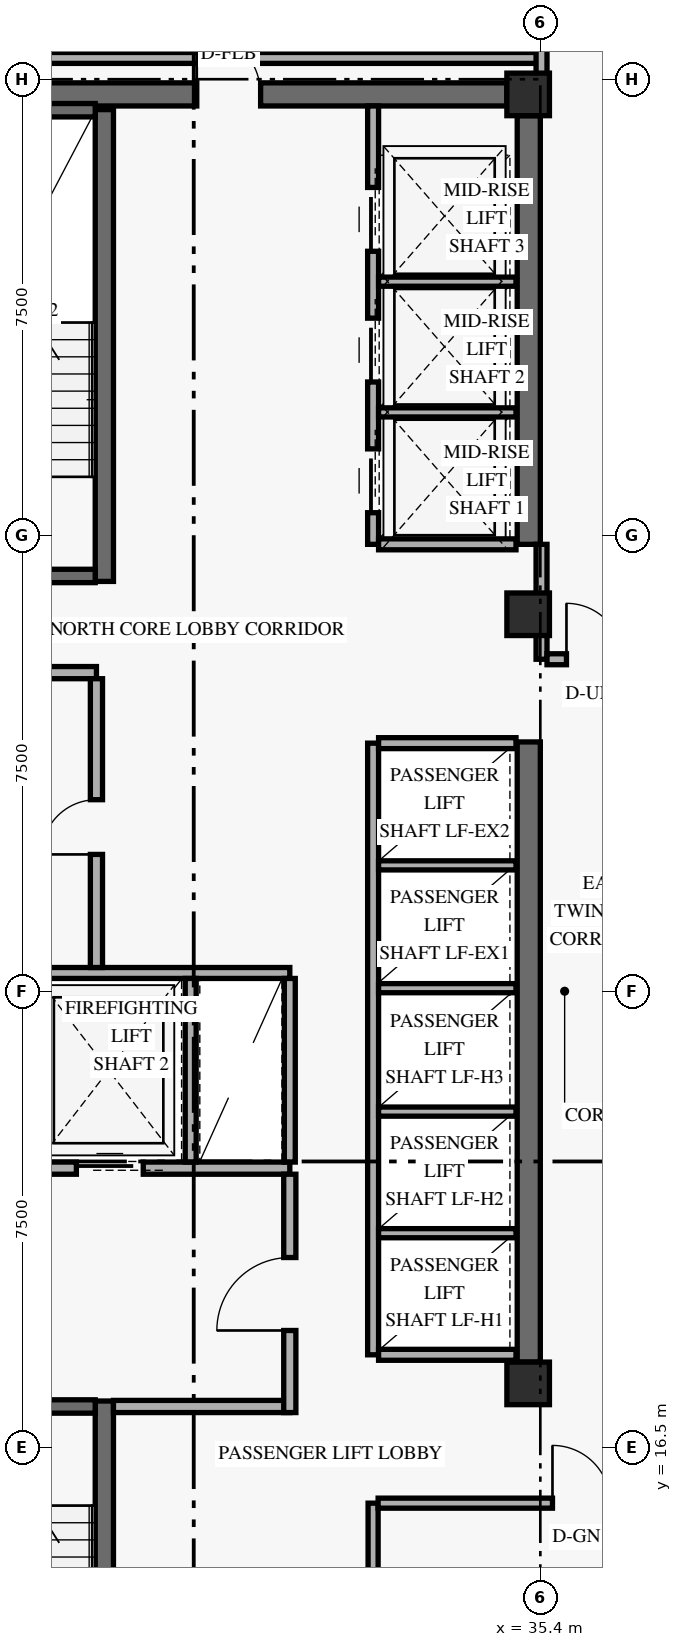
"""IFC4 building model, lengths in metres.
Left out: names, types, materials, properties, quantities, classifications, styles, units other than length and angle.
Written with IfcOpenShell. Run it as: python <this file> out.ifc"""

import sys

from ifc_helpers import new_model, si_unit, direction, frame, frame_2d, origin, origin_2d, place, context, subcontext, project, spatial, rectangle, extrude, element, fill, save


model = new_model("IFC4")
c1 = context("Model", 3, precision=1e-05, world=origin(), true_north=direction((0.0, 1.0)))
c2 = subcontext(c1, "Body", "Model", "MODEL_VIEW")
j1 = project(units=[si_unit("LENGTHUNIT", "METRE"), si_unit("PLANEANGLEUNIT", "RADIAN")], contexts=[c1])
p1 = place(None, origin())
s1 = spatial("IfcSite", under=j1, at=p1, CompositionType="ELEMENT")
p2 = place(p1, origin())
s2 = spatial("IfcBuilding", under=s1, at=p2, CompositionType="ELEMENT")
p3 = place(p2, frame((0.0, 0.0, 144.6)))
s3 = spatial("IfcBuildingStorey", under=s2, at=p3, CompositionType="ELEMENT", Elevation=144.6)
p4 = place(p3, frame((35.21, 17.9, 0.0), z_axis=(0.0, 0.0, 1.0), x_axis=(0.0, 1.0, 0.0)))
e1 = element("IfcWall", 1, at=p4, inside=s3, PredefinedType="SHEAR", context=c2, shape_type="SweptSolid", body=[
    extrude(rectangle(XDim=10.2, YDim=0.38, at=frame_2d((5.1, 0.0))), origin(), (0.0, 0.0, 1.0), 2.748),
])
p5 = place(p3, frame((35.21, 31.35, 0.0), z_axis=(0.0, 0.0, 1.0), x_axis=(0.0, 1.0, 0.0)))
e2 = element("IfcWall", 2, at=p5, inside=s3, PredefinedType="SHEAR", context=c2, shape_type="SweptSolid", body=[
    extrude(rectangle(XDim=7.05, YDim=0.38, at=frame_2d((3.525, 0.0))), origin(), (0.0, 0.0, 1.0), 2.748),
])
p6 = place(p3, frame((24.55, 38.75, 0.0), z_axis=(0.0, 0.0, 1.0), x_axis=(1.0, 0.0, 0.0)))
e3 = element("IfcWall", 3, at=p6, inside=s3, PredefinedType="SHEAR", context=c2, shape_type="SweptSolid", body=[
    extrude(rectangle(XDim=10.3, YDim=0.38, at=frame_2d((5.15, 0.0))), origin(), (0.0, 0.0, 1.0), 3.36),
])
p7 = place(p6, frame((5.2, 0.0, 0.0)))
e4 = element("IfcOpeningElement", 4, at=p7, cuts=e3, PredefinedType="OPENING", context=c2, shape_type="SweptSolid", body=[
    extrude(rectangle(XDim=1.05, YDim=2.15, at=frame_2d((0.525, 1.075))), frame((0.0, 0.2, 0.0), z_axis=(0.0, -1.0, 0.0), x_axis=(1.0, 0.0, 0.0)), (0.0, 0.0, 1.0), 0.4),
])
p8 = place(p3, frame((28.23, 9.5, 0.0), z_axis=(0.0, 0.0, 1.0), x_axis=(0.0, 1.0, 0.0)))
e5 = element("IfcWall", 5, at=p8, inside=s3, PredefinedType="SHEAR", context=c2, shape_type="SweptSolid", body=[
    extrude(rectangle(XDim=7.76, YDim=0.3, at=frame_2d((3.88, 0.0))), origin(), (0.0, 0.0, 1.0), 3.36),
])
p9 = place(p3, frame((24.92, 17.17, 0.0), z_axis=(0.0, 0.0, 1.0), x_axis=(1.0, 0.0, 0.0)))
e6 = element("IfcWall", 6, at=p9, inside=s3, PredefinedType="SHEAR", context=c2, shape_type="SweptSolid", body=[
    extrude(rectangle(XDim=3.16, YDim=0.22, at=frame_2d((1.58, 0.0))), origin(), (0.0, 0.0, 1.0), 3.36),
])
p10 = place(p9, frame((0.78, 0.0, 0.0)))
e7 = element("IfcOpeningElement", 7, at=p10, cuts=e6, PredefinedType="OPENING", context=c2, shape_type="SweptSolid", body=[
    extrude(rectangle(XDim=1.05, YDim=2.15, at=frame_2d((0.525, 1.075))), frame((0.0, 0.12, 0.0), z_axis=(0.0, -1.0, 0.0), x_axis=(1.0, 0.0, 0.0)), (0.0, 0.0, 1.0), 0.24),
])
p11 = place(p3, frame((28.23, 30.74, 0.0), z_axis=(0.0, 0.0, 1.0), x_axis=(0.0, 1.0, 0.0)))
e8 = element("IfcWall", 8, at=p11, inside=s3, PredefinedType="SHEAR", context=c2, shape_type="SweptSolid", body=[
    extrude(rectangle(XDim=7.76, YDim=0.3, at=frame_2d((3.88, 0.0))), origin(), (0.0, 0.0, 1.0), 3.36),
])
p12 = place(p3, frame((24.92, 30.83, 0.0), z_axis=(0.0, 0.0, 1.0), x_axis=(1.0, 0.0, 0.0)))
e9 = element("IfcWall", 9, at=p12, inside=s3, PredefinedType="SHEAR", context=c2, shape_type="SweptSolid", body=[
    extrude(rectangle(XDim=3.16, YDim=0.22, at=frame_2d((1.58, 0.0))), origin(), (0.0, 0.0, 1.0), 3.36),
])
p13 = place(p12, frame((0.78, 0.0, 0.0)))
e10 = element("IfcOpeningElement", 10, at=p13, cuts=e9, PredefinedType="OPENING", context=c2, shape_type="SweptSolid", body=[
    extrude(rectangle(XDim=1.05, YDim=2.15, at=frame_2d((0.525, 1.075))), frame((0.0, 0.12, 0.0), z_axis=(0.0, -1.0, 0.0), x_axis=(1.0, 0.0, 0.0)), (0.0, 0.0, 1.0), 0.24),
])
p14 = place(p3, frame((24.92, 38.49, 0.0), z_axis=(0.0, 0.0, 1.0), x_axis=(1.0, 0.0, 0.0)))
e11 = element("IfcWall", 11, at=p14, inside=s3, PredefinedType="SHEAR", context=c2, shape_type="SweptSolid", body=[
    extrude(rectangle(XDim=3.16, YDim=0.22, at=frame_2d((1.58, 0.0))), origin(), (0.0, 0.0, 1.0), 3.36),
])
for number, where, z_axis, x_axis in (
    (12, (35.2, 17.55, 0.0), (0.0, 0.0, 1.0), (1.0, 0.0, 0.0)),
    (13, (35.2, 30.2, 0.0), (0.0, 0.0, 1.0), (1.0, 0.0, 0.0)),
    (14, (35.2, 38.75, 0.0), (0.0, 0.0, 1.0), (1.0, 0.0, 0.0)),
):
    element("IfcColumn", number, at=place(p3, frame(where, z_axis=z_axis, x_axis=x_axis)), inside=s3, PredefinedType="COLUMN", context=c2, shape_type="SweptSolid", body=[
        extrude(rectangle(XDim=0.7, YDim=0.7, at=origin_2d()), origin(), (0.0, 0.0, 1.0), 3.6),
    ])
p15 = place(p3, frame((24.45, 21.09, 0.0), z_axis=(0.0, 0.0, 1.0), x_axis=(1.0, 0.0, 0.0)))
e15 = element("IfcWall", 15, at=p15, inside=s3, PredefinedType="STANDARD", context=c2, shape_type="SweptSolid", body=[
    extrude(rectangle(XDim=6.83, YDim=0.2, at=frame_2d((3.415, 0.0))), origin(), (0.0, 0.0, 1.0), 3.36),
])
p16 = place(p15, frame((0.72, 0.0, 0.0)))
e16 = element("IfcOpeningElement", 16, at=p16, cuts=e15, PredefinedType="OPENING", context=c2, shape_type="SweptSolid", body=[
    extrude(rectangle(XDim=1.1, YDim=2.2, at=frame_2d((0.55, 1.1))), frame((0.0, 0.11, 0.0), z_axis=(0.0, -1.0, 0.0), x_axis=(1.0, 0.0, 0.0)), (0.0, 0.0, 1.0), 0.22),
])
p17 = place(p15, frame((3.32, 0.0, 0.0)))
e17 = element("IfcOpeningElement", 17, at=p17, cuts=e15, PredefinedType="OPENING", context=c2, shape_type="SweptSolid", body=[
    extrude(rectangle(XDim=1.1, YDim=2.2, at=frame_2d((0.55, 1.1))), frame((0.0, 0.11, 0.0), z_axis=(0.0, -1.0, 0.0), x_axis=(1.0, 0.0, 0.0)), (0.0, 0.0, 1.0), 0.22),
])
p18 = place(p3, frame((28.38, 17.17, 0.0), z_axis=(0.0, 0.0, 1.0), x_axis=(1.0, 0.0, 0.0)))
e18 = element("IfcWall", 18, at=p18, inside=s3, PredefinedType="STANDARD", context=c2, shape_type="SweptSolid", body=[
    extrude(rectangle(XDim=2.9, YDim=0.2, at=frame_2d((1.45, 0.0))), origin(), (0.0, 0.0, 1.0), 3.36),
])
p19 = place(p3, frame((31.28, 17.07, 0.0), z_axis=(0.0, 0.0, 1.0), x_axis=(0.0, 1.0, 0.0)))
e19 = element("IfcWall", 19, at=p19, inside=s3, PredefinedType="STANDARD", context=c2, shape_type="SweptSolid", body=[
    extrude(rectangle(XDim=3.92, YDim=0.2, at=frame_2d((1.96, 0.0))), origin(), (0.0, 0.0, 1.0), 2.73),
])
p20 = place(p19, frame((1.35, 0.0, 0.0)))
e20 = element("IfcOpeningElement", 20, at=p20, cuts=e19, PredefinedType="OPENING", context=c2, shape_type="SweptSolid", body=[
    extrude(rectangle(XDim=1.2, YDim=2.15, at=frame_2d((0.6, 1.075))), frame((0.0, 0.11, 0.0), z_axis=(0.0, -1.0, 0.0), x_axis=(1.0, 0.0, 0.0)), (0.0, 0.0, 1.0), 0.22),
])
p21 = place(p3, frame((24.45, 24.3, 0.0), z_axis=(0.0, 0.0, 1.0), x_axis=(1.0, 0.0, 0.0)))
e21 = element("IfcWall", 21, at=p21, inside=s3, PredefinedType="STANDARD", context=c2, shape_type="SweptSolid", body=[
    extrude(rectangle(XDim=6.83, YDim=0.18, at=frame_2d((3.415, 0.0))), origin(), (0.0, 0.0, 1.0), 3.36),
])
for number, where, z_axis, x_axis in (
    (22, (29.65, 21.19, 0.0), (0.0, 0.0, 1.0), (0.0, 1.0, 0.0)),
    (23, (31.28, 21.19, 0.0), (0.0, 0.0, 1.0), (0.0, 1.0, 0.0)),
):
    element("IfcWall", number, at=place(p3, frame(where, z_axis=z_axis, x_axis=x_axis)), inside=s3, PredefinedType="STANDARD", context=c2, shape_type="SweptSolid", body=[
        extrude(rectangle(XDim=3.02, YDim=0.18, at=frame_2d((1.51, 0.0))), origin(), (0.0, 0.0, 1.0), 3.36),
    ])
p22 = place(p3, frame((24.45, 29.24, 0.0), z_axis=(0.0, 0.0, 1.0), x_axis=(1.0, 0.0, 0.0)))
e24 = element("IfcWall", 24, at=p22, inside=s3, PredefinedType="STANDARD", context=c2, shape_type="SweptSolid", body=[
    extrude(rectangle(XDim=3.65, YDim=0.2, at=frame_2d((1.825, 0.0))), origin(), (0.0, 0.0, 1.0), 3.36),
])
p23 = place(p3, frame((28.1, 24.39, 0.0), z_axis=(0.0, 0.0, 1.0), x_axis=(0.0, 1.0, 0.0)))
e25 = element("IfcWall", 25, at=p23, inside=s3, PredefinedType="STANDARD", context=c2, shape_type="SweptSolid", body=[
    extrude(rectangle(XDim=4.75, YDim=0.2, at=frame_2d((2.375, 0.0))), origin(), (0.0, 0.0, 1.0), 3.36),
])
p24 = place(p23, frame((1.86, 0.0, 0.0)))
e26 = element("IfcOpeningElement", 26, at=p24, cuts=e25, PredefinedType="OPENING", context=c2, shape_type="SweptSolid", body=[
    extrude(rectangle(XDim=0.9, YDim=2.1, at=frame_2d((0.45, 1.05))), frame((0.0, 0.11, 0.0), z_axis=(0.0, -1.0, 0.0), x_axis=(1.0, 0.0, 0.0)), (0.0, 0.0, 1.0), 0.22),
])
p25 = place(p3, frame((32.65, 18.02, 0.0), z_axis=(0.0, 0.0, 1.0), x_axis=(0.0, 1.0, 0.0)))
e27 = element("IfcWall", 27, at=p25, inside=s3, PredefinedType="STANDARD", context=c2, shape_type="SweptSolid", body=[
    extrude(rectangle(XDim=10.06, YDim=0.18, at=frame_2d((5.03, 0.0))), origin(), (0.0, 0.0, 1.0), 3.36),
])
for number, where, z_axis, x_axis in (
    (28, (32.74, 18.02, 0.0), (0.0, 0.0, 1.0), (1.0, 0.0, 0.0)),
    (29, (32.74, 28.08, 0.0), (0.0, 0.0, 1.0), (1.0, 0.0, 0.0)),
):
    element("IfcWall", number, at=place(p3, frame(where, z_axis=z_axis, x_axis=x_axis)), inside=s3, PredefinedType="STANDARD", context=c2, shape_type="SweptSolid", body=[
        extrude(rectangle(XDim=2.26, YDim=0.18, at=frame_2d((1.13, 0.0))), origin(), (0.0, 0.0, 1.0), 3.36),
    ])
for number, where, z_axis, x_axis in (
    (30, (32.74, 20.02, 0.0), (0.0, 0.0, 1.0), (1.0, 0.0, 0.0)),
    (31, (32.74, 22.02, 0.0), (0.0, 0.0, 1.0), (1.0, 0.0, 0.0)),
    (32, (32.74, 24.05, 0.0), (0.0, 0.0, 1.0), (1.0, 0.0, 0.0)),
    (33, (32.74, 26.07, 0.0), (0.0, 0.0, 1.0), (1.0, 0.0, 0.0)),
):
    element("IfcWall", number, at=place(p3, frame(where, z_axis=z_axis, x_axis=x_axis)), inside=s3, PredefinedType="STANDARD", context=c2, shape_type="SweptSolid", body=[
        extrude(rectangle(XDim=2.26, YDim=0.15, at=frame_2d((1.13, 0.0))), origin(), (0.0, 0.0, 1.0), 3.36),
    ])
p26 = place(p3, frame((32.65, 31.35, 0.0), z_axis=(0.0, 0.0, 1.0), x_axis=(0.0, 1.0, 0.0)))
e34 = element("IfcWall", 34, at=p26, inside=s3, PredefinedType="STANDARD", context=c2, shape_type="SweptSolid", body=[
    extrude(rectangle(XDim=7.21, YDim=0.18, at=frame_2d((3.605, 0.0))), origin(), (0.0, 0.0, 1.0), 3.36),
])
p27 = place(p26, frame((0.52, 0.0, 0.0)))
e35 = element("IfcOpeningElement", 35, at=p27, cuts=e34, PredefinedType="OPENING", context=c2, shape_type="SweptSolid", body=[
    extrude(rectangle(XDim=1.05, YDim=2.2, at=frame_2d((0.525, 1.1))), frame((0.0, 0.1, 0.0), z_axis=(0.0, -1.0, 0.0), x_axis=(1.0, 0.0, 0.0)), (0.0, 0.0, 1.0), 0.2),
])
p28 = place(p26, frame((2.67, 0.0, 0.0)))
e36 = element("IfcOpeningElement", 36, at=p28, cuts=e34, PredefinedType="OPENING", context=c2, shape_type="SweptSolid", body=[
    extrude(rectangle(XDim=1.05, YDim=2.2, at=frame_2d((0.525, 1.1))), frame((0.0, 0.1, 0.0), z_axis=(0.0, -1.0, 0.0), x_axis=(1.0, 0.0, 0.0)), (0.0, 0.0, 1.0), 0.2),
])
p29 = place(p26, frame((4.82, 0.0, 0.0)))
e37 = element("IfcOpeningElement", 37, at=p29, cuts=e34, PredefinedType="OPENING", context=c2, shape_type="SweptSolid", body=[
    extrude(rectangle(XDim=1.05, YDim=2.2, at=frame_2d((0.525, 1.1))), frame((0.0, 0.1, 0.0), z_axis=(0.0, -1.0, 0.0), x_axis=(1.0, 0.0, 0.0)), (0.0, 0.0, 1.0), 0.2),
])
p30 = place(p3, frame((32.74, 31.35, 0.0), z_axis=(0.0, 0.0, 1.0), x_axis=(1.0, 0.0, 0.0)))
e38 = element("IfcWall", 38, at=p30, inside=s3, PredefinedType="STANDARD", context=c2, shape_type="SweptSolid", body=[
    extrude(rectangle(XDim=2.26, YDim=0.18, at=frame_2d((1.13, 0.0))), origin(), (0.0, 0.0, 1.0), 3.36),
])
for number, where, z_axis, x_axis in (
    (39, (32.74, 33.52, 0.0), (0.0, 0.0, 1.0), (1.0, 0.0, 0.0)),
    (40, (32.74, 35.67, 0.0), (0.0, 0.0, 1.0), (1.0, 0.0, 0.0)),
):
    element("IfcWall", number, at=place(p3, frame(where, z_axis=z_axis, x_axis=x_axis)), inside=s3, PredefinedType="STANDARD", context=c2, shape_type="SweptSolid", body=[
        extrude(rectangle(XDim=2.26, YDim=0.15, at=frame_2d((1.13, 0.0))), origin(), (0.0, 0.0, 1.0), 3.36),
    ])
p31 = place(p3, frame((32.65, 9.5, 0.0), z_axis=(0.0, 0.0, 1.0), x_axis=(0.0, 1.0, 0.0)))
e41 = element("IfcWall", 41, at=p31, inside=s3, PredefinedType="PARTITIONING", context=c2, shape_type="SweptSolid", body=[
    extrude(rectangle(XDim=6.08, YDim=0.165, at=frame_2d((3.04, 0.0))), origin(), (0.0, 0.0, 1.0), 3.36),
])
p32 = place(p3, frame((32.732, 15.58, 0.0), z_axis=(0.0, 0.0, 1.0), x_axis=(1.0, 0.0, 0.0)))
e42 = element("IfcWall", 42, at=p32, inside=s3, PredefinedType="PARTITIONING", context=c2, shape_type="SweptSolid", body=[
    extrude(rectangle(XDim=5.618, YDim=0.165, at=frame_2d((2.809, 0.0))), origin(), (0.0, 0.0, 1.0), 2.73),
])
p33 = place(p32, frame((2.867, 0.0, 0.0)))
e43 = element("IfcOpeningElement", 43, at=p33, cuts=e42, PredefinedType="OPENING", context=c2, shape_type="SweptSolid", body=[
    extrude(rectangle(XDim=0.95, YDim=2.15, at=frame_2d((0.475, 1.075))), frame((0.0, 0.093, 0.0), z_axis=(0.0, -1.0, 0.0), x_axis=(1.0, 0.0, 0.0)), (0.0, 0.0, 1.0), 0.185),
])
p34 = place(p3, frame((35.42, 29.46, 0.0), z_axis=(0.0, 0.0, 1.0), x_axis=(0.0, 1.0, 0.0)))
e44 = element("IfcWall", 44, at=p34, inside=s3, PredefinedType="STANDARD", context=c2, shape_type="SweptSolid", body=[
    extrude(rectangle(XDim=1.89, YDim=0.18, at=frame_2d((0.945, 0.0))), origin(), (0.0, 0.0, 1.0), 2.73),
])
p35 = place(p3, frame((35.51, 29.46, 0.0), z_axis=(0.0, 0.0, 1.0), x_axis=(1.0, 0.0, 0.0)))
e45 = element("IfcWall", 45, at=p35, inside=s3, PredefinedType="STANDARD", context=c2, shape_type="SweptSolid", body=[
    extrude(rectangle(XDim=12.49, YDim=0.18, at=frame_2d((6.245, 0.0))), origin(), (0.0, 0.0, 1.0), 2.73),
])
p36 = place(p35, frame((0.32, 0.0, 0.0)))
e46 = element("IfcOpeningElement", 46, at=p36, cuts=e45, PredefinedType="OPENING", context=c2, shape_type="SweptSolid", body=[
    extrude(rectangle(XDim=0.92, YDim=2.15, at=frame_2d((0.46, 1.075))), frame((0.0, 0.1, 0.0), z_axis=(0.0, -1.0, 0.0), x_axis=(1.0, 0.0, 0.0)), (0.0, 0.0, 1.0), 0.2),
])
p37 = place(p3, frame((23.85, 39.35, 0.0), z_axis=(0.0, 0.0, 1.0), x_axis=(1.0, 0.0, 0.0)))
e47 = element("IfcWall", 47, at=p37, inside=s3, PredefinedType="STANDARD", context=c2, shape_type="SweptSolid", body=[
    extrude(rectangle(XDim=11.57, YDim=0.18, at=frame_2d((5.785, 0.0))), origin(), (0.0, 0.0, 1.0), 2.73),
])
p38 = place(p3, frame((35.42, 38.75, 0.0), z_axis=(0.0, 0.0, 1.0), x_axis=(0.0, 1.0, 0.0)))
e48 = element("IfcWall", 48, at=p38, inside=s3, PredefinedType="PARTITIONING", context=c2, shape_type="SweptSolid", body=[
    extrude(rectangle(XDim=4.97, YDim=0.18, at=frame_2d((2.485, 0.0))), origin(), (0.0, 0.0, 1.0), 2.73),
])
p39 = place(p17, origin())
e49 = element("IfcDoor", 49, at=p39, inside=s3, OperationType="SLIDING_TO_LEFT", PredefinedType="DOOR", context=c2, shape_type="SweptSolid", body=[
    extrude(rectangle(XDim=1.1, YDim=2.2, at=frame_2d((0.55, 1.1))), frame((0.0, 0.025, 0.0), z_axis=(0.0, -1.0, 0.0), x_axis=(1.0, 0.0, 0.0)), (0.0, 0.0, 1.0), 0.05),
])
fill(e17, e49)
p40 = place(p20, origin())
e50 = element("IfcDoor", 50, at=p40, inside=s3, OperationType="SINGLE_SWING_LEFT", PredefinedType="DOOR", context=c2, shape_type="SweptSolid", body=[
    extrude(rectangle(XDim=1.2, YDim=2.15, at=frame_2d((0.6, 1.075))), frame((0.0, 0.025, 0.0), z_axis=(0.0, -1.0, 0.0), x_axis=(1.0, 0.0, 0.0)), (0.0, 0.0, 1.0), 0.05),
])
fill(e20, e50)
p41 = place(p24, origin())
e51 = element("IfcDoor", 51, at=p41, inside=s3, OperationType="SINGLE_SWING_LEFT", PredefinedType="DOOR", context=c2, shape_type="SweptSolid", body=[
    extrude(rectangle(XDim=0.9, YDim=2.1, at=frame_2d((0.45, 1.05))), frame((0.0, 0.025, 0.0), z_axis=(0.0, -1.0, 0.0), x_axis=(1.0, 0.0, 0.0)), (0.0, 0.0, 1.0), 0.05),
])
fill(e26, e51)
p42 = place(p27, origin())
e52 = element("IfcDoor", 52, at=p42, inside=s3, OperationType="SLIDING_TO_LEFT", PredefinedType="DOOR", context=c2, shape_type="SweptSolid", body=[
    extrude(rectangle(XDim=1.05, YDim=2.2, at=frame_2d((0.525, 1.1))), frame((0.0, 0.025, 0.0), z_axis=(0.0, -1.0, 0.0), x_axis=(1.0, 0.0, 0.0)), (0.0, 0.0, 1.0), 0.05),
])
fill(e35, e52)
p43 = place(p28, origin())
e53 = element("IfcDoor", 53, at=p43, inside=s3, OperationType="SLIDING_TO_LEFT", PredefinedType="DOOR", context=c2, shape_type="SweptSolid", body=[
    extrude(rectangle(XDim=1.05, YDim=2.2, at=frame_2d((0.525, 1.1))), frame((0.0, 0.025, 0.0), z_axis=(0.0, -1.0, 0.0), x_axis=(1.0, 0.0, 0.0)), (0.0, 0.0, 1.0), 0.05),
])
fill(e36, e53)
p44 = place(p29, origin())
e54 = element("IfcDoor", 54, at=p44, inside=s3, OperationType="SLIDING_TO_LEFT", PredefinedType="DOOR", context=c2, shape_type="SweptSolid", body=[
    extrude(rectangle(XDim=1.05, YDim=2.2, at=frame_2d((0.525, 1.1))), frame((0.0, 0.025, 0.0), z_axis=(0.0, -1.0, 0.0), x_axis=(1.0, 0.0, 0.0)), (0.0, 0.0, 1.0), 0.05),
])
fill(e37, e54)
p45 = place(p33, origin())
e55 = element("IfcDoor", 55, at=p45, inside=s3, OperationType="SINGLE_SWING_LEFT", PredefinedType="DOOR", context=c2, shape_type="SweptSolid", body=[
    extrude(rectangle(XDim=0.95, YDim=2.15, at=frame_2d((0.475, 1.075))), frame((0.0, 0.025, 0.0), z_axis=(0.0, -1.0, 0.0), x_axis=(1.0, 0.0, 0.0)), (0.0, 0.0, 1.0), 0.05),
])
fill(e43, e55)
p46 = place(p7, frame((1.05, 0.0, 0.0), z_axis=(0.0, 0.0, 1.0), x_axis=(-1.0, 0.0, 0.0)))
e56 = element("IfcDoor", 56, at=p46, inside=s3, OperationType="SINGLE_SWING_RIGHT", PredefinedType="DOOR", context=c2, shape_type="SweptSolid", body=[
    extrude(rectangle(XDim=1.05, YDim=2.15, at=frame_2d((0.525, 1.075))), frame((0.0, 0.025, 0.0), z_axis=(0.0, -1.0, 0.0), x_axis=(1.0, 0.0, 0.0)), (0.0, 0.0, 1.0), 0.05),
])
fill(e4, e56)
p47 = place(p36, origin())
e57 = element("IfcDoor", 57, at=p47, inside=s3, OperationType="SINGLE_SWING_LEFT", PredefinedType="DOOR", context=c2, shape_type="SweptSolid", body=[
    extrude(rectangle(XDim=0.92, YDim=2.15, at=frame_2d((0.46, 1.075))), frame((0.0, 0.025, 0.0), z_axis=(0.0, -1.0, 0.0), x_axis=(1.0, 0.0, 0.0)), (0.0, 0.0, 1.0), 0.05),
])
fill(e46, e57)
save(model, sys.argv[1])
